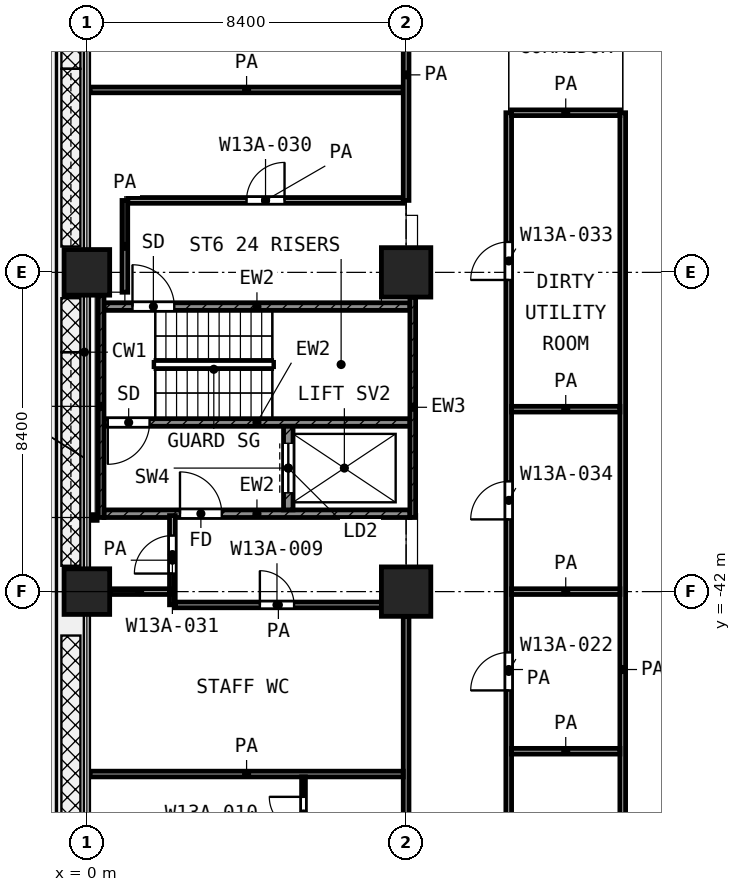
"""IFC4 building model, lengths in metres.
Left out: names, types, materials, properties, quantities, classifications, styles, units other than length and angle.
Written with IfcOpenShell. Run it as: python <this file> out.ifc"""

import sys

from ifc_helpers import new_model, si_unit, direction, frame, frame_2d, origin, origin_2d, place, context, subcontext, project, spatial, rectangle, extrude, element, fill, save


model = new_model("IFC4")
c1 = context("Model", 3, precision=1e-05, world=origin(), true_north=direction((0.0, 1.0)))
c2 = subcontext(c1, "Body", "Model", "MODEL_VIEW")
j1 = project(units=[si_unit("LENGTHUNIT", "METRE"), si_unit("PLANEANGLEUNIT", "RADIAN")], contexts=[c1])
p1 = place(None, origin())
s1 = spatial("IfcSite", under=j1, at=p1, CompositionType="ELEMENT")
p2 = place(p1, origin())
s2 = spatial("IfcBuilding", under=s1, at=p2, CompositionType="ELEMENT")
p3 = place(p2, frame((0.0, 0.0, 60.2)))
s3 = spatial("IfcBuildingStorey", under=s2, at=p3, CompositionType="ELEMENT", Elevation=60.2)
p4 = place(p3, frame((0.0, -33.6, 0.0), z_axis=(0.0, 0.0, 1.0), x_axis=(1.0, 0.0, 0.0)))
e1 = element("IfcColumn", 1, at=p4, inside=s3, PredefinedType="COLUMN", context=c2, shape_type="SweptSolid", body=[
    extrude(rectangle(XDim=1.2, YDim=1.2, at=origin_2d()), origin(), (0.0, 0.0, 1.0), 4.2),
])
p5 = place(p3, frame((8.4, -33.6, 0.0), z_axis=(0.0, 0.0, 1.0), x_axis=(1.0, 0.0, 0.0)))
e2 = element("IfcColumn", 2, at=p5, inside=s3, PredefinedType="COLUMN", context=c2, shape_type="SweptSolid", body=[
    extrude(rectangle(XDim=1.3, YDim=1.3, at=origin_2d()), origin(), (0.0, 0.0, 1.0), 4.2),
])
p6 = place(p3, frame((0.0, -42.0, 0.0), z_axis=(0.0, 0.0, 1.0), x_axis=(1.0, 0.0, 0.0)))
e3 = element("IfcColumn", 3, at=p6, inside=s3, PredefinedType="COLUMN", context=c2, shape_type="SweptSolid", body=[
    extrude(rectangle(XDim=1.2, YDim=1.2, at=origin_2d()), origin(), (0.0, 0.0, 1.0), 4.2),
])
p7 = place(p3, frame((8.4, -42.0, 0.0), z_axis=(0.0, 0.0, 1.0), x_axis=(1.0, 0.0, 0.0)))
e4 = element("IfcColumn", 4, at=p7, inside=s3, PredefinedType="COLUMN", context=c2, shape_type="SweptSolid", body=[
    extrude(rectangle(XDim=1.3, YDim=1.3, at=origin_2d()), origin(), (0.0, 0.0, 1.0), 4.2),
])
p8 = place(p3, frame((0.375, -40.05, 0.0), z_axis=(0.0, 0.0, 1.0), x_axis=(0.0, 1.0, 0.0)))
e5 = element("IfcWall", 5, at=p8, inside=s3, PredefinedType="SHEAR", context=c2, shape_type="SweptSolid", body=[
    extrude(rectangle(XDim=5.85, YDim=0.15, at=frame_2d((2.925, 0.0))), origin(), (0.0, 0.0, 1.0), 3.9),
])
p9 = place(p3, frame((8.575, -40.05, 0.0), z_axis=(0.0, 0.0, 1.0), x_axis=(0.0, 1.0, 0.0)))
e6 = element("IfcWall", 6, at=p9, inside=s3, PredefinedType="SHEAR", context=c2, shape_type="SweptSolid", body=[
    extrude(rectangle(XDim=5.8, YDim=0.15, at=frame_2d((2.9, 0.0))), origin(), (0.0, 0.0, 1.0), 3.9),
])
p10 = place(p3, frame((0.45, -34.5, 0.0), z_axis=(0.0, 0.0, 1.0), x_axis=(1.0, 0.0, 0.0)))
e7 = element("IfcWall", 7, at=p10, inside=s3, PredefinedType="SHEAR", context=c2, shape_type="SweptSolid", body=[
    extrude(rectangle(XDim=8.05, YDim=0.2, at=frame_2d((4.025, 0.0))), origin(), (0.0, 0.0, 1.0), 3.9),
])
p11 = place(p10, frame((0.75, 0.0, 0.0)))
e8 = element("IfcOpeningElement", 8, at=p11, cuts=e7, PredefinedType="OPENING", context=c2, shape_type="SweptSolid", body=[
    extrude(rectangle(XDim=1.1, YDim=2.1, at=frame_2d((0.55, 1.05))), frame((0.0, 0.11, 0.0), z_axis=(0.0, -1.0, 0.0), x_axis=(1.0, 0.0, 0.0)), (0.0, 0.0, 1.0), 0.22),
])
p12 = place(p3, frame((0.45, -37.55, 0.0), z_axis=(0.0, 0.0, 1.0), x_axis=(1.0, 0.0, 0.0)))
e9 = element("IfcWall", 9, at=p12, inside=s3, PredefinedType="SHEAR", context=c2, shape_type="SweptSolid", body=[
    extrude(rectangle(XDim=8.05, YDim=0.2, at=frame_2d((4.025, 0.0))), origin(), (0.0, 0.0, 1.0), 3.9),
])
p13 = place(p12, frame((0.1, 0.0, 0.0)))
e10 = element("IfcOpeningElement", 10, at=p13, cuts=e9, PredefinedType="OPENING", context=c2, shape_type="SweptSolid", body=[
    extrude(rectangle(XDim=1.1, YDim=2.1, at=frame_2d((0.55, 1.05))), frame((0.0, 0.11, 0.0), z_axis=(0.0, -1.0, 0.0), x_axis=(1.0, 0.0, 0.0)), (0.0, 0.0, 1.0), 0.22),
])
p14 = place(p3, frame((0.45, -39.95, 0.0), z_axis=(0.0, 0.0, 1.0), x_axis=(1.0, 0.0, 0.0)))
e11 = element("IfcWall", 11, at=p14, inside=s3, PredefinedType="SHEAR", context=c2, shape_type="SweptSolid", body=[
    extrude(rectangle(XDim=8.05, YDim=0.2, at=frame_2d((4.025, 0.0))), origin(), (0.0, 0.0, 1.0), 3.9),
])
p15 = place(p14, frame((2.0, 0.0, 0.0)))
e12 = element("IfcOpeningElement", 12, at=p15, cuts=e11, PredefinedType="OPENING", context=c2, shape_type="SweptSolid", body=[
    extrude(rectangle(XDim=1.1, YDim=2.1, at=frame_2d((0.55, 1.05))), frame((0.0, 0.11, 0.0), z_axis=(0.0, -1.0, 0.0), x_axis=(1.0, 0.0, 0.0)), (0.0, 0.0, 1.0), 0.22),
])
p16 = place(p3, frame((5.3, -39.85, 0.0), z_axis=(0.0, 0.0, 1.0), x_axis=(0.0, 1.0, 0.0)))
e13 = element("IfcWall", 13, at=p16, inside=s3, PredefinedType="SHEAR", context=c2, shape_type="SweptSolid", body=[
    extrude(rectangle(XDim=2.2, YDim=0.25, at=frame_2d((1.1, 0.0))), origin(), (0.0, 0.0, 1.0), 3.9),
])
p17 = place(p16, frame((0.45, 0.0, 0.0)))
e14 = element("IfcOpeningElement", 14, at=p17, cuts=e13, PredefinedType="OPENING", context=c2, shape_type="SweptSolid", body=[
    extrude(rectangle(XDim=1.3, YDim=2.1, at=frame_2d((0.65, 1.05))), frame((0.0, 0.135, 0.0), z_axis=(0.0, -1.0, 0.0), x_axis=(1.0, 0.0, 0.0)), (0.0, 0.0, 1.0), 0.27),
])
p18 = place(p3, frame((5.7, -48.9, 0.0), z_axis=(0.0, 0.0, 1.0), x_axis=(0.0, 1.0, 0.0)))
e15 = element("IfcWall", 15, at=p18, inside=s3, PredefinedType="PARTITIONING", context=c2, shape_type="SweptSolid", body=[
    extrude(rectangle(XDim=2.025, YDim=0.1, at=frame_2d((1.012, 0.0))), origin(), (0.0, 0.0, 1.0), 3.9),
])
p19 = place(p18, frame((0.6, 0.0, 0.0)))
e16 = element("IfcOpeningElement", 16, at=p19, cuts=e15, PredefinedType="OPENING", context=c2, shape_type="SweptSolid", body=[
    extrude(rectangle(XDim=0.9, YDim=2.1, at=frame_2d((0.45, 1.05))), frame((0.0, 0.06, 0.0), z_axis=(0.0, -1.0, 0.0), x_axis=(1.0, 0.0, 0.0)), (0.0, 0.0, 1.0), 0.12),
])
p20 = place(p3, frame((0.08, -46.8, 0.0), z_axis=(0.0, 0.0, 1.0), x_axis=(1.0, 0.0, 0.0)))
e17 = element("IfcWall", 17, at=p20, inside=s3, PredefinedType="PARTITIONING", context=c2, shape_type="SweptSolid", body=[
    extrude(rectangle(XDim=8.245, YDim=0.15, at=frame_2d((4.123, 0.0))), origin(), (0.0, 0.0, 1.0), 3.9),
])
p21 = place(p3, frame((11.175, -46.2, 0.0), z_axis=(0.0, 0.0, 1.0), x_axis=(1.0, 0.0, 0.0)))
e18 = element("IfcWall", 18, at=p21, inside=s3, PredefinedType="PARTITIONING", context=c2, shape_type="SweptSolid", body=[
    extrude(rectangle(XDim=2.85, YDim=0.15, at=frame_2d((1.425, 0.0))), origin(), (0.0, 0.0, 1.0), 3.9),
])
p22 = place(p3, frame((2.328, -42.35, 0.0), z_axis=(0.0, 0.0, 1.0), x_axis=(1.0, 0.0, 0.0)))
e19 = element("IfcWall", 19, at=p22, inside=s3, PredefinedType="PARTITIONING", context=c2, shape_type="SweptSolid", body=[
    extrude(rectangle(XDim=5.422, YDim=0.15, at=frame_2d((2.711, 0.0))), origin(), (0.0, 0.0, 1.0), 3.9),
])
p23 = place(p22, frame((2.224, 0.0, 0.0)))
e20 = element("IfcOpeningElement", 20, at=p23, cuts=e19, PredefinedType="OPENING", context=c2, shape_type="SweptSolid", body=[
    extrude(rectangle(XDim=0.9, YDim=2.1, at=frame_2d((0.45, 1.05))), frame((0.0, 0.085, 0.0), z_axis=(0.0, -1.0, 0.0), x_axis=(1.0, 0.0, 0.0)), (0.0, 0.0, 1.0), 0.17),
])
p24 = place(p3, frame((0.6, -42.0, 0.0), z_axis=(0.0, 0.0, 1.0), x_axis=(1.0, 0.0, 0.0)))
e21 = element("IfcWall", 21, at=p24, inside=s3, PredefinedType="PARTITIONING", context=c2, shape_type="SweptSolid", body=[
    extrude(rectangle(XDim=1.575, YDim=0.15, at=frame_2d((0.788, 0.0))), origin(), (0.0, 0.0, 1.0), 3.9),
])
p25 = place(p3, frame((11.175, -42.0, 0.0), z_axis=(0.0, 0.0, 1.0), x_axis=(1.0, 0.0, 0.0)))
e22 = element("IfcWall", 22, at=p25, inside=s3, PredefinedType="PARTITIONING", context=c2, shape_type="SweptSolid", body=[
    extrude(rectangle(XDim=2.85, YDim=0.15, at=frame_2d((1.425, 0.0))), origin(), (0.0, 0.0, 1.0), 3.9),
])
p26 = place(p3, frame((0.08, -40.05, 0.0), z_axis=(0.0, 0.0, 1.0), x_axis=(1.0, 0.0, 0.0)))
e23 = element("IfcWall", 23, at=p26, inside=s3, PredefinedType="PARTITIONING", context=c2, shape_type="SweptSolid", body=[
    extrude(rectangle(XDim=0.19, YDim=0.15, at=frame_2d((0.095, 0.0))), origin(), (0.0, 0.0, 1.0), 3.9),
])
p27 = place(p3, frame((11.175, -37.2, 0.0), z_axis=(0.0, 0.0, 1.0), x_axis=(1.0, 0.0, 0.0)))
e24 = element("IfcWall", 24, at=p27, inside=s3, PredefinedType="PARTITIONING", context=c2, shape_type="SweptSolid", body=[
    extrude(rectangle(XDim=2.85, YDim=0.15, at=frame_2d((1.425, 0.0))), origin(), (0.0, 0.0, 1.0), 3.9),
])
p28 = place(p3, frame((1.077, -31.707, 0.0), z_axis=(0.0, 0.0, 1.0), x_axis=(1.0, 0.0, 0.0)))
e25 = element("IfcWall", 25, at=p28, inside=s3, PredefinedType="PARTITIONING", context=c2, shape_type="SweptSolid", body=[
    extrude(rectangle(XDim=7.248, YDim=0.15, at=frame_2d((3.624, 0.0))), origin(), (0.0, 0.0, 1.0), 3.9),
])
p29 = place(p28, frame((3.124, 0.0, 0.0)))
e26 = element("IfcOpeningElement", 26, at=p29, cuts=e25, PredefinedType="OPENING", context=c2, shape_type="SweptSolid", body=[
    extrude(rectangle(XDim=1.0, YDim=2.1, at=frame_2d((0.5, 1.05))), frame((0.0, 0.085, 0.0), z_axis=(0.0, -1.0, 0.0), x_axis=(1.0, 0.0, 0.0)), (0.0, 0.0, 1.0), 0.17),
])
p30 = place(p3, frame((11.175, -29.4, 0.0), z_axis=(0.0, 0.0, 1.0), x_axis=(1.0, 0.0, 0.0)))
e27 = element("IfcWall", 27, at=p30, inside=s3, PredefinedType="PARTITIONING", context=c2, shape_type="SweptSolid", body=[
    extrude(rectangle(XDim=2.85, YDim=0.15, at=frame_2d((1.425, 0.0))), origin(), (0.0, 0.0, 1.0), 3.9),
])
p31 = place(p3, frame((0.08, -28.8, 0.0), z_axis=(0.0, 0.0, 1.0), x_axis=(1.0, 0.0, 0.0)))
e28 = element("IfcWall", 28, at=p31, inside=s3, PredefinedType="PARTITIONING", context=c2, shape_type="SweptSolid", body=[
    extrude(rectangle(XDim=8.245, YDim=0.15, at=frame_2d((4.123, 0.0))), origin(), (0.0, 0.0, 1.0), 3.9),
])
p32 = place(p3, frame((1.0, -34.123, 0.0), z_axis=(0.0, 0.0, 1.0), x_axis=(0.0, 1.0, 0.0)))
e29 = element("IfcWall", 29, at=p32, inside=s3, PredefinedType="PARTITIONING", context=c2, shape_type="SweptSolid", body=[
    extrude(rectangle(XDim=2.415, YDim=0.15, at=frame_2d((1.208, 0.0))), origin(), (0.0, 0.0, 1.0), 3.9),
])
p33 = place(p3, frame((2.25, -42.347, 0.0), z_axis=(0.0, 0.0, 1.0), x_axis=(0.0, 1.0, 0.0)))
e30 = element("IfcWall", 30, at=p33, inside=s3, PredefinedType="PARTITIONING", context=c2, shape_type="SweptSolid", body=[
    extrude(rectangle(XDim=2.347, YDim=0.15, at=frame_2d((1.173, 0.0))), origin(), (0.0, 0.0, 1.0), 3.9),
])
p34 = place(p33, frame((0.822, 0.0, 0.0)))
e31 = element("IfcOpeningElement", 31, at=p34, cuts=e30, PredefinedType="OPENING", context=c2, shape_type="SweptSolid", body=[
    extrude(rectangle(XDim=1.0, YDim=2.1, at=frame_2d((0.5, 1.05))), frame((0.0, 0.085, 0.0), z_axis=(0.0, -1.0, 0.0), x_axis=(1.0, 0.0, 0.0)), (0.0, 0.0, 1.0), 0.17),
])
p35 = place(p3, frame((8.4, -66.55, 0.0), z_axis=(0.0, 0.0, 1.0), x_axis=(0.0, 1.0, 0.0)))
e32 = element("IfcWall", 32, at=p35, inside=s3, PredefinedType="PARTITIONING", context=c2, shape_type="SweptSolid", body=[
    extrude(rectangle(XDim=23.9, YDim=0.15, at=frame_2d((11.95, 0.0))), origin(), (0.0, 0.0, 1.0), 3.9),
])
p36 = place(p35, frame((14.55, 0.0, 0.0)))
e33 = element("IfcOpeningElement", 33, at=p36, cuts=e32, PredefinedType="OPENING", context=c2, shape_type="SweptSolid", body=[
    extrude(rectangle(XDim=0.9, YDim=2.1, at=frame_2d((0.45, 1.05))), frame((0.0, 0.085, 0.0), z_axis=(0.0, -1.0, 0.0), x_axis=(1.0, 0.0, 0.0)), (0.0, 0.0, 1.0), 0.17),
])
p37 = place(p35, frame((12.7, 0.0, 0.0)))
e34 = element("IfcOpeningElement", 34, at=p37, cuts=e32, PredefinedType="OPENING", context=c2, shape_type="SweptSolid", body=[
    extrude(rectangle(XDim=1.2, YDim=2.1, at=frame_2d((0.6, 1.05))), frame((0.0, 0.085, 0.0), z_axis=(0.0, -1.0, 0.0), x_axis=(1.0, 0.0, 0.0)), (0.0, 0.0, 1.0), 0.17),
])
p38 = place(p35, frame((5.85, 0.0, 0.0)))
e35 = element("IfcOpeningElement", 35, at=p38, cuts=e32, PredefinedType="OPENING", context=c2, shape_type="SweptSolid", body=[
    extrude(rectangle(XDim=1.2, YDim=2.1, at=frame_2d((0.6, 1.05))), frame((0.0, 0.085, 0.0), z_axis=(0.0, -1.0, 0.0), x_axis=(1.0, 0.0, 0.0)), (0.0, 0.0, 1.0), 0.17),
])
p39 = place(p35, frame((8.45, 0.0, 0.0)))
e36 = element("IfcOpeningElement", 36, at=p39, cuts=e32, PredefinedType="OPENING", context=c2, shape_type="SweptSolid", body=[
    extrude(rectangle(XDim=1.2, YDim=2.1, at=frame_2d((0.6, 1.05))), frame((0.0, 0.085, 0.0), z_axis=(0.0, -1.0, 0.0), x_axis=(1.0, 0.0, 0.0)), (0.0, 0.0, 1.0), 0.17),
])
p40 = place(p35, frame((3.7, 0.0, 0.0)))
e37 = element("IfcOpeningElement", 37, at=p40, cuts=e32, PredefinedType="OPENING", context=c2, shape_type="SweptSolid", body=[
    extrude(rectangle(XDim=1.2, YDim=2.1, at=frame_2d((0.6, 1.05))), frame((0.0, 0.085, 0.0), z_axis=(0.0, -1.0, 0.0), x_axis=(1.0, 0.0, 0.0)), (0.0, 0.0, 1.0), 0.17),
])
p41 = place(p35, frame((1.175, 0.0, 0.0)))
e38 = element("IfcOpeningElement", 38, at=p41, cuts=e32, PredefinedType="OPENING", context=c2, shape_type="SweptSolid", body=[
    extrude(rectangle(XDim=0.9, YDim=2.1, at=frame_2d((0.45, 1.05))), frame((0.0, 0.085, 0.0), z_axis=(0.0, -1.0, 0.0), x_axis=(1.0, 0.0, 0.0)), (0.0, 0.0, 1.0), 0.17),
])
p42 = place(p3, frame((8.4, -31.707, 0.0), z_axis=(0.0, 0.0, 1.0), x_axis=(0.0, 1.0, 0.0)))
e39 = element("IfcWall", 39, at=p42, inside=s3, PredefinedType="PARTITIONING", context=c2, shape_type="SweptSolid", body=[
    extrude(rectangle(XDim=6.607, YDim=0.15, at=frame_2d((3.303, 0.0))), origin(), (0.0, 0.0, 1.0), 3.9),
])
p43 = place(p42, frame((4.107, 0.0, 0.0)))
e40 = element("IfcOpeningElement", 40, at=p43, cuts=e39, PredefinedType="OPENING", context=c2, shape_type="SweptSolid", body=[
    extrude(rectangle(XDim=1.2, YDim=2.1, at=frame_2d((0.6, 1.05))), frame((0.0, 0.085, 0.0), z_axis=(0.0, -1.0, 0.0), x_axis=(1.0, 0.0, 0.0)), (0.0, 0.0, 1.0), 0.17),
])
p44 = place(p3, frame((11.1, -58.7, 0.0), z_axis=(0.0, 0.0, 1.0), x_axis=(0.0, 1.0, 0.0)))
e41 = element("IfcWall", 41, at=p44, inside=s3, PredefinedType="PARTITIONING", context=c2, shape_type="SweptSolid", body=[
    extrude(rectangle(XDim=29.3, YDim=0.15, at=frame_2d((14.65, 0.0))), origin(), (0.0, 0.0, 1.0), 3.9),
])
p45 = place(p44, frame((24.9, 0.0, 0.0)))
e42 = element("IfcOpeningElement", 42, at=p45, cuts=e41, PredefinedType="OPENING", context=c2, shape_type="SweptSolid", body=[
    extrude(rectangle(XDim=1.0, YDim=2.1, at=frame_2d((0.5, 1.05))), frame((0.0, 0.085, 0.0), z_axis=(0.0, -1.0, 0.0), x_axis=(1.0, 0.0, 0.0)), (0.0, 0.0, 1.0), 0.17),
])
p46 = place(p44, frame((18.6, 0.0, 0.0)))
e43 = element("IfcOpeningElement", 43, at=p46, cuts=e41, PredefinedType="OPENING", context=c2, shape_type="SweptSolid", body=[
    extrude(rectangle(XDim=1.0, YDim=2.1, at=frame_2d((0.5, 1.05))), frame((0.0, 0.085, 0.0), z_axis=(0.0, -1.0, 0.0), x_axis=(1.0, 0.0, 0.0)), (0.0, 0.0, 1.0), 0.17),
])
p47 = place(p44, frame((14.1, 0.0, 0.0)))
e44 = element("IfcOpeningElement", 44, at=p47, cuts=e41, PredefinedType="OPENING", context=c2, shape_type="SweptSolid", body=[
    extrude(rectangle(XDim=1.0, YDim=2.1, at=frame_2d((0.5, 1.05))), frame((0.0, 0.085, 0.0), z_axis=(0.0, -1.0, 0.0), x_axis=(1.0, 0.0, 0.0)), (0.0, 0.0, 1.0), 0.17),
])
p48 = place(p44, frame((1.2, 0.0, 0.0)))
e45 = element("IfcOpeningElement", 45, at=p48, cuts=e41, PredefinedType="OPENING", context=c2, shape_type="SweptSolid", body=[
    extrude(rectangle(XDim=1.0, YDim=2.1, at=frame_2d((0.5, 1.05))), frame((0.0, 0.085, 0.0), z_axis=(0.0, -1.0, 0.0), x_axis=(1.0, 0.0, 0.0)), (0.0, 0.0, 1.0), 0.17),
])
p49 = place(p3, frame((14.1, -58.7, 0.0), z_axis=(0.0, 0.0, 1.0), x_axis=(0.0, 1.0, 0.0)))
e46 = element("IfcWall", 46, at=p49, inside=s3, PredefinedType="PARTITIONING", context=c2, shape_type="SweptSolid", body=[
    extrude(rectangle(XDim=29.3, YDim=0.15, at=frame_2d((14.65, 0.0))), origin(), (0.0, 0.0, 1.0), 3.9),
])
p50 = place(p49, frame((7.5, 0.0, 0.0)))
e47 = element("IfcOpeningElement", 47, at=p50, cuts=e46, PredefinedType="OPENING", context=c2, shape_type="SweptSolid", body=[
    extrude(rectangle(XDim=1.0, YDim=2.1, at=frame_2d((0.5, 1.05))), frame((0.0, 0.085, 0.0), z_axis=(0.0, -1.0, 0.0), x_axis=(1.0, 0.0, 0.0)), (0.0, 0.0, 1.0), 0.17),
])
p51 = place(p11, origin())
e48 = element("IfcDoor", 48, at=p51, inside=s3, OperationType="SINGLE_SWING_LEFT", PredefinedType="DOOR", context=c2, shape_type="SweptSolid", body=[
    extrude(rectangle(XDim=1.1, YDim=2.1, at=frame_2d((0.55, 1.05))), frame((0.0, 0.025, 0.0), z_axis=(0.0, -1.0, 0.0), x_axis=(1.0, 0.0, 0.0)), (0.0, 0.0, 1.0), 0.05),
])
fill(e8, e48)
p52 = place(p13, frame((1.1, 0.0, 0.0), z_axis=(0.0, 0.0, 1.0), x_axis=(-1.0, 0.0, 0.0)))
e49 = element("IfcDoor", 49, at=p52, inside=s3, OperationType="SINGLE_SWING_LEFT", PredefinedType="DOOR", context=c2, shape_type="SweptSolid", body=[
    extrude(rectangle(XDim=1.1, YDim=2.1, at=frame_2d((0.55, 1.05))), frame((0.0, 0.025, 0.0), z_axis=(0.0, -1.0, 0.0), x_axis=(1.0, 0.0, 0.0)), (0.0, 0.0, 1.0), 0.05),
])
fill(e10, e49)
p53 = place(p17, origin())
e50 = element("IfcDoor", 50, at=p53, inside=s3, OperationType="DOUBLE_DOOR_SLIDING", PredefinedType="DOOR", context=c2, shape_type="SweptSolid", body=[
    extrude(rectangle(XDim=1.3, YDim=2.1, at=frame_2d((0.65, 1.05))), frame((0.0, 0.025, 0.0), z_axis=(0.0, -1.0, 0.0), x_axis=(1.0, 0.0, 0.0)), (0.0, 0.0, 1.0), 0.05),
])
fill(e14, e50)
p54 = place(p15, origin())
e51 = element("IfcDoor", 51, at=p54, inside=s3, OperationType="SINGLE_SWING_LEFT", PredefinedType="DOOR", context=c2, shape_type="SweptSolid", body=[
    extrude(rectangle(XDim=1.1, YDim=2.1, at=frame_2d((0.55, 1.05))), frame((0.0, 0.025, 0.0), z_axis=(0.0, -1.0, 0.0), x_axis=(1.0, 0.0, 0.0)), (0.0, 0.0, 1.0), 0.05),
])
fill(e12, e51)
p55 = place(p29, origin())
e52 = element("IfcDoor", 52, at=p55, inside=s3, OperationType="SINGLE_SWING_RIGHT", PredefinedType="DOOR", context=c2, shape_type="SweptSolid", body=[
    extrude(rectangle(XDim=1.0, YDim=2.1, at=frame_2d((0.5, 1.05))), frame((0.0, 0.025, 0.0), z_axis=(0.0, -1.0, 0.0), x_axis=(1.0, 0.0, 0.0)), (0.0, 0.0, 1.0), 0.05),
])
fill(e26, e52)
p56 = place(p34, origin())
e53 = element("IfcDoor", 53, at=p56, inside=s3, OperationType="SINGLE_SWING_LEFT", PredefinedType="DOOR", context=c2, shape_type="SweptSolid", body=[
    extrude(rectangle(XDim=1.0, YDim=2.1, at=frame_2d((0.5, 1.05))), frame((0.0, 0.025, 0.0), z_axis=(0.0, -1.0, 0.0), x_axis=(1.0, 0.0, 0.0)), (0.0, 0.0, 1.0), 0.05),
])
fill(e31, e53)
p57 = place(p23, origin())
e54 = element("IfcDoor", 54, at=p57, inside=s3, OperationType="SINGLE_SWING_LEFT", PredefinedType="DOOR", context=c2, shape_type="SweptSolid", body=[
    extrude(rectangle(XDim=0.9, YDim=2.1, at=frame_2d((0.45, 1.05))), frame((0.0, 0.025, 0.0), z_axis=(0.0, -1.0, 0.0), x_axis=(1.0, 0.0, 0.0)), (0.0, 0.0, 1.0), 0.05),
])
fill(e20, e54)
p58 = place(p19, origin())
e55 = element("IfcDoor", 55, at=p58, inside=s3, OperationType="SINGLE_SWING_RIGHT", PredefinedType="DOOR", context=c2, shape_type="SweptSolid", body=[
    extrude(rectangle(XDim=0.9, YDim=2.1, at=frame_2d((0.45, 1.05))), frame((0.0, 0.025, 0.0), z_axis=(0.0, -1.0, 0.0), x_axis=(1.0, 0.0, 0.0)), (0.0, 0.0, 1.0), 0.05),
])
fill(e16, e55)
p59 = place(p45, origin())
e56 = element("IfcDoor", 56, at=p59, inside=s3, OperationType="SINGLE_SWING_LEFT", PredefinedType="DOOR", context=c2, shape_type="SweptSolid", body=[
    extrude(rectangle(XDim=1.0, YDim=2.1, at=frame_2d((0.5, 1.05))), frame((0.0, 0.025, 0.0), z_axis=(0.0, -1.0, 0.0), x_axis=(1.0, 0.0, 0.0)), (0.0, 0.0, 1.0), 0.05),
])
fill(e42, e56)
p60 = place(p46, origin())
e57 = element("IfcDoor", 57, at=p60, inside=s3, OperationType="SINGLE_SWING_LEFT", PredefinedType="DOOR", context=c2, shape_type="SweptSolid", body=[
    extrude(rectangle(XDim=1.0, YDim=2.1, at=frame_2d((0.5, 1.05))), frame((0.0, 0.025, 0.0), z_axis=(0.0, -1.0, 0.0), x_axis=(1.0, 0.0, 0.0)), (0.0, 0.0, 1.0), 0.05),
])
fill(e43, e57)
p61 = place(p47, origin())
e58 = element("IfcDoor", 58, at=p61, inside=s3, OperationType="SINGLE_SWING_LEFT", PredefinedType="DOOR", context=c2, shape_type="SweptSolid", body=[
    extrude(rectangle(XDim=1.0, YDim=2.1, at=frame_2d((0.5, 1.05))), frame((0.0, 0.025, 0.0), z_axis=(0.0, -1.0, 0.0), x_axis=(1.0, 0.0, 0.0)), (0.0, 0.0, 1.0), 0.05),
])
fill(e44, e58)
save(model, sys.argv[1])
